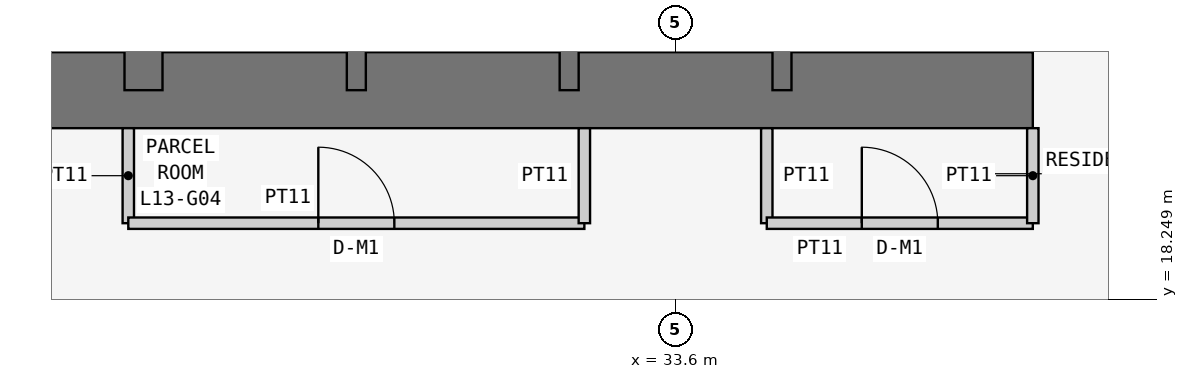
"""IFC4 building model, lengths in metres.
Left out: names, types, materials, properties, quantities, classifications, styles, units other than length and angle.
Written with IfcOpenShell. Run it as: python <this file> out.ifc"""

import sys

from ifc_helpers import new_model, si_unit, direction, frame, frame_2d, origin, place, context, subcontext, project, spatial, rectangle, extrude, element, fill, save


model = new_model("IFC4")
c1 = context("Model", 3, precision=1e-05, world=origin(), true_north=direction((0.0, 1.0)))
c2 = subcontext(c1, "Body", "Model", "MODEL_VIEW")
j1 = project(units=[si_unit("LENGTHUNIT", "METRE"), si_unit("PLANEANGLEUNIT", "RADIAN")], contexts=[c1])
p1 = place(None, origin())
s1 = spatial("IfcSite", under=j1, at=p1, CompositionType="ELEMENT")
p2 = place(p1, origin())
s2 = spatial("IfcBuilding", under=s1, at=p2, CompositionType="ELEMENT")
p3 = place(p2, frame((0.0, 0.0, 56.1)))
s3 = spatial("IfcBuildingStorey", under=s2, at=p3, CompositionType="ELEMENT", Elevation=56.1)
p4 = place(p3, frame((21.0, 21.0, 0.0), z_axis=(0.0, 0.0, 1.0), x_axis=(1.0, 0.0, 0.0)))
e1 = element("IfcWall", 1, at=p4, inside=s3, PredefinedType="SHEAR", context=c2, shape_type="SweptSolid", body=[
    extrude(rectangle(XDim=17.3, YDim=1.0, at=frame_2d((8.65, 0.0))), origin(), (0.0, 0.0, 1.0), 3.6),
])
p5 = place(p3, frame((37.8, 21.0, 0.0), z_axis=(0.0, 0.0, 1.0), x_axis=(0.0, 1.0, 0.0)))
e2 = element("IfcWall", 2, at=p5, inside=s3, PredefinedType="SHEAR", context=c2, shape_type="SweptSolid", body=[
    extrude(rectangle(XDim=17.3, YDim=1.0, at=frame_2d((8.65, 0.0))), origin(), (0.0, 0.0, 1.0), 3.6),
])
p6 = place(p5, frame((5.2, 0.0, 0.0)))
e3 = element("IfcOpeningElement", 3, at=p6, cuts=e2, PredefinedType="OPENING", context=c2, shape_type="SweptSolid", body=[
    extrude(rectangle(XDim=1.2, YDim=2.1, at=frame_2d((0.6, 1.05))), frame((0.0, 0.51, 0.0), z_axis=(0.0, -1.0, 0.0), x_axis=(1.0, 0.0, 0.0)), (0.0, 0.0, 1.0), 1.02),
])
p7 = place(p3, frame((26.6, 21.0, 0.0), z_axis=(0.0, 0.0, 1.0), x_axis=(0.0, 1.0, 0.0)))
e4 = element("IfcWall", 4, at=p7, inside=s3, PredefinedType="SHEAR", context=c2, shape_type="SweptSolid", body=[
    extrude(rectangle(XDim=16.8, YDim=0.5, at=frame_2d((8.4, 0.0))), origin(), (0.0, 0.0, 1.0), 3.6),
])
p8 = place(p7, frame((10.4, 0.0, 0.0)))
e5 = element("IfcOpeningElement", 5, at=p8, cuts=e4, PredefinedType="OPENING", context=c2, shape_type="SweptSolid", body=[
    extrude(rectangle(XDim=1.2, YDim=2.1, at=frame_2d((0.6, 1.05))), frame((0.0, 0.26, 0.0), z_axis=(0.0, -1.0, 0.0), x_axis=(1.0, 0.0, 0.0)), (0.0, 0.0, 1.0), 0.52),
])
for number, where, z_axis, x_axis in (
    (6, (29.4, 21.0, 0.0), (0.0, 0.0, 1.0), (0.0, 1.0, 0.0)),
    (7, (32.2, 21.0, 0.0), (0.0, 0.0, 1.0), (0.0, 1.0, 0.0)),
    (8, (35.0, 21.0, 0.0), (0.0, 0.0, 1.0), (0.0, 1.0, 0.0)),
):
    element("IfcWall", number, at=place(p3, frame(where, z_axis=z_axis, x_axis=x_axis)), inside=s3, PredefinedType="SHEAR", context=c2, shape_type="SweptSolid", body=[
        extrude(rectangle(XDim=3.2, YDim=0.25, at=frame_2d((1.6, 0.0))), origin(), (0.0, 0.0, 1.0), 3.6),
    ])
p9 = place(p3, frame((26.4, 20.5, 0.0), z_axis=(0.0, 0.0, 1.0), x_axis=(0.0, -1.0, 0.0)))
e9 = element("IfcWall", 9, at=p9, inside=s3, PredefinedType="PARTITIONING", context=c2, shape_type="SweptSolid", body=[
    extrude(rectangle(XDim=1.25, YDim=0.15, at=frame_2d((0.625, 0.0))), origin(), (0.0, 0.0, 1.0), 3.45),
])
p10 = place(p3, frame((26.4, 19.25, 0.0), z_axis=(0.0, 0.0, 1.0), x_axis=(1.0, 0.0, 0.0)))
e10 = element("IfcWall", 10, at=p10, inside=s3, PredefinedType="PARTITIONING", context=c2, shape_type="SweptSolid", body=[
    extrude(rectangle(XDim=6.0, YDim=0.15, at=frame_2d((3.0, 0.0))), origin(), (0.0, 0.0, 1.0), 3.45),
])
p11 = place(p10, frame((2.5, 0.0, 0.0)))
e11 = element("IfcOpeningElement", 11, at=p11, cuts=e10, PredefinedType="OPENING", context=c2, shape_type="SweptSolid", body=[
    extrude(rectangle(XDim=1.0, YDim=2.1, at=frame_2d((0.5, 1.05))), frame((0.0, 0.085, 0.0), z_axis=(0.0, -1.0, 0.0), x_axis=(1.0, 0.0, 0.0)), (0.0, 0.0, 1.0), 0.17),
])
for number, where, z_axis, x_axis in (
    (12, (32.4, 19.25, 0.0), (0.0, 0.0, 1.0), (0.0, 1.0, 0.0)),
    (13, (34.8, 20.5, 0.0), (0.0, 0.0, 1.0), (0.0, -1.0, 0.0)),
):
    element("IfcWall", number, at=place(p3, frame(where, z_axis=z_axis, x_axis=x_axis)), inside=s3, PredefinedType="PARTITIONING", context=c2, shape_type="SweptSolid", body=[
        extrude(rectangle(XDim=1.25, YDim=0.15, at=frame_2d((0.625, 0.0))), origin(), (0.0, 0.0, 1.0), 3.45),
    ])
p12 = place(p3, frame((34.8, 19.25, 0.0), z_axis=(0.0, 0.0, 1.0), x_axis=(1.0, 0.0, 0.0)))
e14 = element("IfcWall", 14, at=p12, inside=s3, PredefinedType="PARTITIONING", context=c2, shape_type="SweptSolid", body=[
    extrude(rectangle(XDim=3.5, YDim=0.15, at=frame_2d((1.75, 0.0))), origin(), (0.0, 0.0, 1.0), 3.45),
])
p13 = place(p12, frame((1.25, 0.0, 0.0)))
e15 = element("IfcOpeningElement", 15, at=p13, cuts=e14, PredefinedType="OPENING", context=c2, shape_type="SweptSolid", body=[
    extrude(rectangle(XDim=1.0, YDim=2.1, at=frame_2d((0.5, 1.05))), frame((0.0, 0.085, 0.0), z_axis=(0.0, -1.0, 0.0), x_axis=(1.0, 0.0, 0.0)), (0.0, 0.0, 1.0), 0.17),
])
p14 = place(p3, frame((38.3, 19.25, 0.0), z_axis=(0.0, 0.0, 1.0), x_axis=(0.0, 1.0, 0.0)))
e16 = element("IfcWall", 16, at=p14, inside=s3, PredefinedType="PARTITIONING", context=c2, shape_type="SweptSolid", body=[
    extrude(rectangle(XDim=1.25, YDim=0.15, at=frame_2d((0.625, 0.0))), origin(), (0.0, 0.0, 1.0), 3.45),
])
p15 = place(p11, origin())
e17 = element("IfcDoor", 17, at=p15, inside=s3, OperationType="SINGLE_SWING_LEFT", PredefinedType="DOOR", context=c2, shape_type="SweptSolid", body=[
    extrude(rectangle(XDim=1.0, YDim=2.1, at=frame_2d((0.5, 1.05))), frame((0.0, 0.025, 0.0), z_axis=(0.0, -1.0, 0.0), x_axis=(1.0, 0.0, 0.0)), (0.0, 0.0, 1.0), 0.05),
])
fill(e11, e17)
p16 = place(p13, origin())
e18 = element("IfcDoor", 18, at=p16, inside=s3, OperationType="SINGLE_SWING_LEFT", PredefinedType="DOOR", context=c2, shape_type="SweptSolid", body=[
    extrude(rectangle(XDim=1.0, YDim=2.1, at=frame_2d((0.5, 1.05))), frame((0.0, 0.025, 0.0), z_axis=(0.0, -1.0, 0.0), x_axis=(1.0, 0.0, 0.0)), (0.0, 0.0, 1.0), 0.05),
])
fill(e15, e18)
save(model, sys.argv[1])
